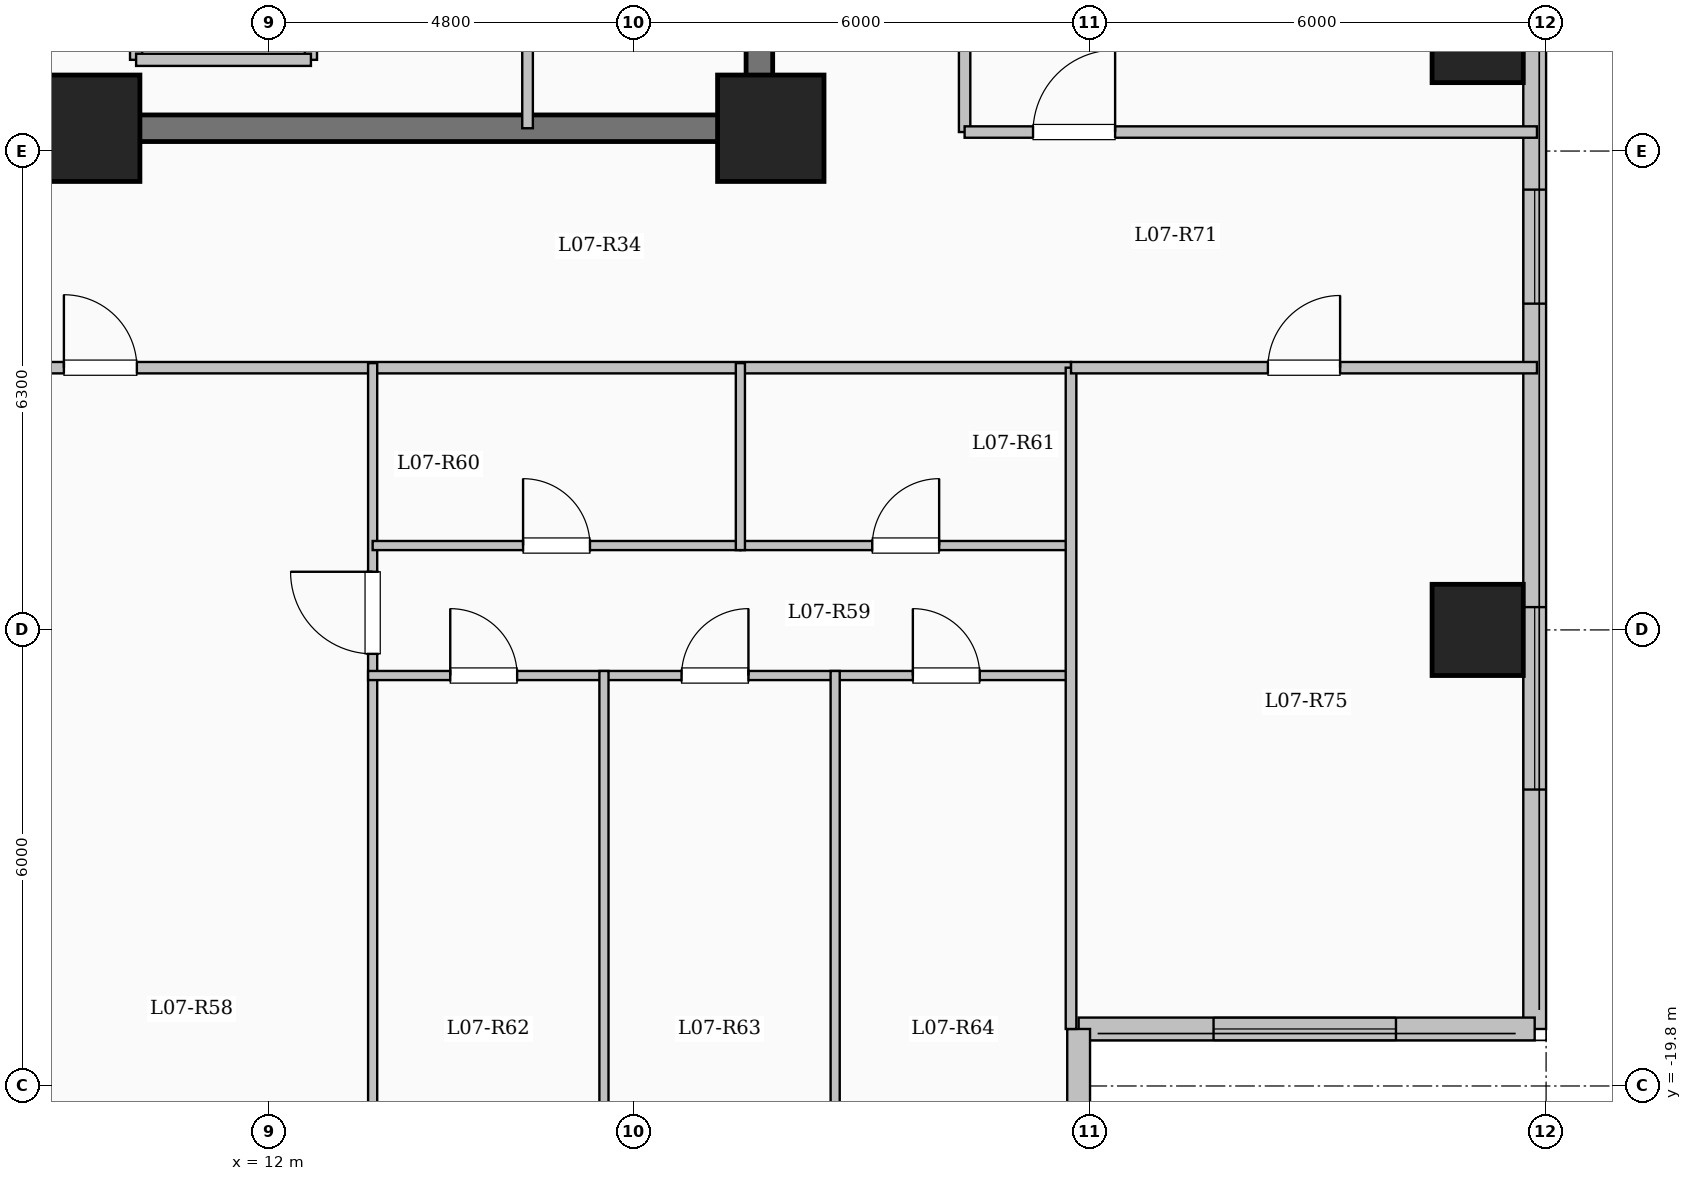
"""IFC4 building model, lengths in metres.
Left out: names, types, materials, properties, quantities, classifications, styles, units other than length and angle.
Written with IfcOpenShell. Run it as: python <this file> out.ifc"""

import sys

from ifc_helpers import new_model, si_unit, direction, frame, frame_2d, origin, origin_2d, place, context, subcontext, project, spatial, rectangle, extrude, element, fill, save


model = new_model("IFC4")
c1 = context("Model", 3, precision=1e-05, world=origin(), true_north=direction((0.0, 1.0)))
c2 = subcontext(c1, "Body", "Model", "MODEL_VIEW")
j1 = project(units=[si_unit("LENGTHUNIT", "METRE"), si_unit("PLANEANGLEUNIT", "RADIAN")], contexts=[c1])
p1 = place(None, origin())
s1 = spatial("IfcSite", under=j1, at=p1, CompositionType="ELEMENT")
p2 = place(p1, origin())
s2 = spatial("IfcBuilding", under=s1, at=p2, CompositionType="ELEMENT")
p3 = place(p2, frame((0.0, 0.0, 30.7)))
s3 = spatial("IfcBuildingStorey", under=s2, at=p3, CompositionType="ELEMENT", Elevation=30.7)
for number, where, z_axis, x_axis in (
    (1, (9.6, -7.2, 0.0), (0.0, 0.0, 1.0), (1.0, 0.0, 0.0)),
    (2, (18.6, -7.2, 0.0), (0.0, 0.0, 1.0), (1.0, 0.0, 0.0)),
):
    element("IfcColumn", number, at=place(p3, frame(where, z_axis=z_axis, x_axis=x_axis)), inside=s3, PredefinedType="COLUMN", context=c2, shape_type="SweptSolid", body=[
        extrude(rectangle(XDim=1.4, YDim=1.4, at=origin_2d()), origin(), (0.0, 0.0, 1.0), 3.35),
    ])
for number, where, z_axis, x_axis in (
    (3, (27.9, -13.8, 0.0), (0.0, 0.0, 1.0), (1.0, 0.0, 0.0)),
    (4, (27.9, -6.0, 0.0), (0.0, 0.0, 1.0), (1.0, 0.0, 0.0)),
):
    element("IfcColumn", number, at=place(p3, frame(where, z_axis=z_axis, x_axis=x_axis)), inside=s3, PredefinedType="COLUMN", context=c2, shape_type="SweptSolid", body=[
        extrude(rectangle(XDim=1.2, YDim=1.2, at=origin_2d()), origin(), (0.0, 0.0, 1.0), 3.35),
    ])
p4 = place(p3, frame((28.65, 19.05, 0.0), z_axis=(0.0, 0.0, 1.0), x_axis=(0.0, -1.0, 0.0)))
e5 = element("IfcWall", 5, at=p4, inside=s3, PredefinedType="SOLIDWALL", context=c2, shape_type="SweptSolid", body=[
    extrude(rectangle(XDim=38.1, YDim=0.3, at=frame_2d((19.05, 0.0))), origin(), (0.0, 0.0, 1.0), 3.1),
])
p5 = place(p4, frame((2.275, 0.0, 0.9)))
e6 = element("IfcOpeningElement", 6, at=p5, cuts=e5, PredefinedType="OPENING", context=c2, shape_type="SweptSolid", body=[
    extrude(rectangle(XDim=2.0, YDim=1.7, at=frame_2d((1.0, 0.85))), frame((0.0, 0.16, 0.0), z_axis=(0.0, -1.0, 0.0), x_axis=(1.0, 0.0, 0.0)), (0.0, 0.0, 1.0), 0.32),
])
p6 = place(p4, frame((6.925, 0.0, 0.95)))
e7 = element("IfcOpeningElement", 7, at=p6, cuts=e5, PredefinedType="OPENING", context=c2, shape_type="SweptSolid", body=[
    extrude(rectangle(XDim=1.0, YDim=1.5, at=frame_2d((0.5, 0.75))), frame((0.0, 0.16, 0.0), z_axis=(0.0, -1.0, 0.0), x_axis=(1.0, 0.0, 0.0)), (0.0, 0.0, 1.0), 0.32),
])
p7 = place(p4, frame((16.3, 0.0, 0.9)))
e8 = element("IfcOpeningElement", 8, at=p7, cuts=e5, PredefinedType="OPENING", context=c2, shape_type="SweptSolid", body=[
    extrude(rectangle(XDim=2.0, YDim=1.7, at=frame_2d((1.0, 0.85))), frame((0.0, 0.16, 0.0), z_axis=(0.0, -1.0, 0.0), x_axis=(1.0, 0.0, 0.0)), (0.0, 0.0, 1.0), 0.32),
])
p8 = place(p4, frame((27.058, 0.0, 0.9)))
e9 = element("IfcOpeningElement", 9, at=p8, cuts=e5, PredefinedType="OPENING", context=c2, shape_type="SweptSolid", body=[
    extrude(rectangle(XDim=1.5, YDim=1.65, at=frame_2d((0.75, 0.825))), frame((0.0, 0.16, 0.0), z_axis=(0.0, -1.0, 0.0), x_axis=(1.0, 0.0, 0.0)), (0.0, 0.0, 1.0), 0.32),
])
p9 = place(p4, frame((32.55, 0.0, 0.9)))
e10 = element("IfcOpeningElement", 10, at=p9, cuts=e5, PredefinedType="OPENING", context=c2, shape_type="SweptSolid", body=[
    extrude(rectangle(XDim=2.4, YDim=1.8, at=frame_2d((1.2, 0.9))), frame((0.0, 0.16, 0.0), z_axis=(0.0, -1.0, 0.0), x_axis=(1.0, 0.0, 0.0)), (0.0, 0.0, 1.0), 0.32),
])
p10 = place(p3, frame((28.65, -19.05, 0.0), z_axis=(0.0, 0.0, 1.0), x_axis=(-1.0, 0.0, 0.0)))
e11 = element("IfcWall", 11, at=p10, inside=s3, PredefinedType="SOLIDWALL", context=c2, shape_type="SweptSolid", body=[
    extrude(rectangle(XDim=6.0, YDim=0.3, at=frame_2d((3.0, 0.0))), origin(), (0.0, 0.0, 1.0), 3.1),
])
p11 = place(p10, frame((1.825, 0.0, 0.9)))
e12 = element("IfcOpeningElement", 12, at=p11, cuts=e11, PredefinedType="OPENING", context=c2, shape_type="SweptSolid", body=[
    extrude(rectangle(XDim=2.4, YDim=1.8, at=frame_2d((1.2, 0.9))), frame((0.0, 0.16, 0.0), z_axis=(0.0, -1.0, 0.0), x_axis=(1.0, 0.0, 0.0)), (0.0, 0.0, 1.0), 0.32),
])
p12 = place(p3, frame((22.65, -19.05, 0.0), z_axis=(0.0, 0.0, 1.0), x_axis=(0.0, -1.0, 0.0)))
e13 = element("IfcWall", 13, at=p12, inside=s3, PredefinedType="SOLIDWALL", context=c2, shape_type="SweptSolid", body=[
    extrude(rectangle(XDim=4.5, YDim=0.3, at=frame_2d((2.25, 0.0))), origin(), (0.0, 0.0, 1.0), 3.1),
])
p13 = place(p12, frame((1.333, 0.0, 0.9)))
e14 = element("IfcOpeningElement", 14, at=p13, cuts=e13, PredefinedType="OPENING", context=c2, shape_type="SweptSolid", body=[
    extrude(rectangle(XDim=1.8, YDim=1.65, at=frame_2d((0.9, 0.825))), frame((0.0, 0.16, 0.0), z_axis=(0.0, -1.0, 0.0), x_axis=(1.0, 0.0, 0.0)), (0.0, 0.0, 1.0), 0.32),
])
for number, where, z_axis, x_axis in (
    (15, (10.25, -6.3, 0.0), (0.0, 0.0, 1.0), (0.0, 1.0, 0.0)),
    (16, (12.55, -6.3, 0.0), (0.0, 0.0, 1.0), (0.0, 1.0, 0.0)),
):
    element("IfcWall", number, at=place(p3, frame(where, z_axis=z_axis, x_axis=x_axis)), inside=s3, PredefinedType="SOLIDWALL", context=c2, shape_type="SweptSolid", body=[
        extrude(rectangle(XDim=2.6, YDim=0.16, at=frame_2d((1.3, 0.0))), origin(), (0.0, 0.0, 1.0), 3.1),
    ])
p14 = place(p3, frame((10.25, -6.3, 0.0), z_axis=(0.0, 0.0, 1.0), x_axis=(1.0, 0.0, 0.0)))
e17 = element("IfcWall", 17, at=p14, inside=s3, PredefinedType="SOLIDWALL", context=c2, shape_type="SweptSolid", body=[
    extrude(rectangle(XDim=2.3, YDim=0.16, at=frame_2d((1.15, 0.0))), origin(), (0.0, 0.0, 1.0), 3.1),
])
p15 = place(p3, frame((18.45, -7.375, 0.0), z_axis=(0.0, 0.0, 1.0), x_axis=(0.0, 1.0, 0.0)))
e18 = element("IfcWall", 18, at=p15, inside=s3, PredefinedType="SHEAR", context=c2, shape_type="SweptSolid", body=[
    extrude(rectangle(XDim=14.05, YDim=0.35, at=frame_2d((7.025, 0.0))), origin(), (0.0, 0.0, 1.0), 3.35),
])
p16 = place(p3, frame((10.075, -7.2, 0.0), z_axis=(0.0, 0.0, 1.0), x_axis=(1.0, 0.0, 0.0)))
e19 = element("IfcWall", 19, at=p16, inside=s3, PredefinedType="SHEAR", context=c2, shape_type="SweptSolid", body=[
    extrude(rectangle(XDim=8.55, YDim=0.35, at=frame_2d((4.275, 0.0))), origin(), (0.0, 0.0, 1.0), 3.35),
])
p17 = place(p3, frame((15.4, -7.2, 0.0), z_axis=(0.0, 0.0, 1.0), x_axis=(0.0, 1.0, 0.0)))
e20 = element("IfcWall", 20, at=p17, inside=s3, PredefinedType="PARTITIONING", context=c2, shape_type="SweptSolid", body=[
    extrude(rectangle(XDim=10.45, YDim=0.14, at=frame_2d((5.225, 0.0))), origin(), (0.0, 0.0, 1.0), 3.1),
])
p18 = place(p17, frame((9.25, 0.0, 0.0)))
e21 = element("IfcOpeningElement", 21, at=p18, cuts=e20, PredefinedType="OPENING", context=c2, shape_type="SweptSolid", body=[
    extrude(rectangle(XDim=0.9, YDim=2.08, at=frame_2d((0.45, 1.04))), frame((0.0, 0.08, 0.0), z_axis=(0.0, -1.0, 0.0), x_axis=(1.0, 0.0, 0.0)), (0.0, 0.0, 1.0), 0.16),
])
p19 = place(p3, frame((21.15, -7.25, 0.0), z_axis=(0.0, 0.0, 1.0), x_axis=(0.0, 1.0, 0.0)))
e22 = element("IfcWall", 22, at=p19, inside=s3, PredefinedType="PARTITIONING", context=c2, shape_type="SweptSolid", body=[
    extrude(rectangle(XDim=18.0, YDim=0.15, at=frame_2d((9.0, 0.0))), origin(), (0.0, 0.0, 1.0), 2.585),
])
p20 = place(p3, frame((8.55, -10.35, 0.0), z_axis=(0.0, 0.0, 1.0), x_axis=(1.0, 0.0, 0.0)))
e23 = element("IfcWall", 23, at=p20, inside=s3, PredefinedType="PARTITIONING", context=c2, shape_type="SweptSolid", body=[
    extrude(rectangle(XDim=14.0, YDim=0.15, at=frame_2d((7.0, 0.0))), origin(), (0.0, 0.0, 1.0), 3.1),
])
p21 = place(p20, frame((0.75, 0.0, 0.0)))
e24 = element("IfcOpeningElement", 24, at=p21, cuts=e23, PredefinedType="OPENING", context=c2, shape_type="SweptSolid", body=[
    extrude(rectangle(XDim=0.96, YDim=2.15, at=frame_2d((0.48, 1.075))), frame((0.0, 0.085, 0.0), z_axis=(0.0, -1.0, 0.0), x_axis=(1.0, 0.0, 0.0)), (0.0, 0.0, 1.0), 0.17),
])
p22 = place(p3, frame((13.362, -23.6, 0.0), z_axis=(0.0, 0.0, 1.0), x_axis=(0.0, 1.0, 0.0)))
e25 = element("IfcWall", 25, at=p22, inside=s3, PredefinedType="PARTITIONING", context=c2, shape_type="SweptSolid", body=[
    extrude(rectangle(XDim=13.31, YDim=0.12, at=frame_2d((6.655, 0.0))), origin(), (0.0, 0.0, 1.0), 3.1),
])
p23 = place(p22, frame((9.485, 0.0, 0.0)))
e26 = element("IfcOpeningElement", 26, at=p23, cuts=e25, PredefinedType="OPENING", context=c2, shape_type="SweptSolid", body=[
    extrude(rectangle(XDim=1.08, YDim=2.15, at=frame_2d((0.54, 1.075))), frame((0.0, 0.07, 0.0), z_axis=(0.0, -1.0, 0.0), x_axis=(1.0, 0.0, 0.0)), (0.0, 0.0, 1.0), 0.14),
])
p24 = place(p3, frame((13.362, -12.69, 0.0), z_axis=(0.0, 0.0, 1.0), x_axis=(1.0, 0.0, 0.0)))
e27 = element("IfcWall", 27, at=p24, inside=s3, PredefinedType="PARTITIONING", context=c2, shape_type="SweptSolid", body=[
    extrude(rectangle(XDim=4.838, YDim=0.12, at=frame_2d((2.419, 0.0))), origin(), (0.0, 0.0, 1.0), 2.585),
])
p25 = place(p24, frame((1.979, 0.0, 0.0)))
e28 = element("IfcOpeningElement", 28, at=p25, cuts=e27, PredefinedType="OPENING", context=c2, shape_type="SweptSolid", body=[
    extrude(rectangle(XDim=0.88, YDim=2.1, at=frame_2d((0.44, 1.05))), frame((0.0, 0.07, 0.0), z_axis=(0.0, -1.0, 0.0), x_axis=(1.0, 0.0, 0.0)), (0.0, 0.0, 1.0), 0.14),
])
p26 = place(p3, frame((18.2, -12.69, 0.0), z_axis=(0.0, 0.0, 1.0), x_axis=(1.0, 0.0, 0.0)))
e29 = element("IfcWall", 29, at=p26, inside=s3, PredefinedType="PARTITIONING", context=c2, shape_type="SweptSolid", body=[
    extrude(rectangle(XDim=4.35, YDim=0.12, at=frame_2d((2.175, 0.0))), origin(), (0.0, 0.0, 1.0), 3.1),
])
p27 = place(p26, frame((1.735, 0.0, 0.0)))
e30 = element("IfcOpeningElement", 30, at=p27, cuts=e29, PredefinedType="OPENING", context=c2, shape_type="SweptSolid", body=[
    extrude(rectangle(XDim=0.88, YDim=2.1, at=frame_2d((0.44, 1.05))), frame((0.0, 0.07, 0.0), z_axis=(0.0, -1.0, 0.0), x_axis=(1.0, 0.0, 0.0)), (0.0, 0.0, 1.0), 0.14),
])
p28 = place(p3, frame((13.302, -14.4, 0.0), z_axis=(0.0, 0.0, 1.0), x_axis=(1.0, 0.0, 0.0)))
e31 = element("IfcWall", 31, at=p28, inside=s3, PredefinedType="PARTITIONING", context=c2, shape_type="SweptSolid", body=[
    extrude(rectangle(XDim=9.308, YDim=0.12, at=frame_2d((4.654, 0.0))), origin(), (0.0, 0.0, 1.0), 3.1),
])
p29 = place(p28, frame((1.081, 0.0, 0.0)))
e32 = element("IfcOpeningElement", 32, at=p29, cuts=e31, PredefinedType="OPENING", context=c2, shape_type="SweptSolid", body=[
    extrude(rectangle(XDim=0.88, YDim=2.1, at=frame_2d((0.44, 1.05))), frame((0.0, 0.07, 0.0), z_axis=(0.0, -1.0, 0.0), x_axis=(1.0, 0.0, 0.0)), (0.0, 0.0, 1.0), 0.14),
])
p30 = place(p28, frame((4.124, 0.0, 0.0)))
e33 = element("IfcOpeningElement", 33, at=p30, cuts=e31, PredefinedType="OPENING", context=c2, shape_type="SweptSolid", body=[
    extrude(rectangle(XDim=0.88, YDim=2.1, at=frame_2d((0.44, 1.05))), frame((0.0, 0.07, 0.0), z_axis=(0.0, -1.0, 0.0), x_axis=(1.0, 0.0, 0.0)), (0.0, 0.0, 1.0), 0.14),
])
p31 = place(p28, frame((7.167, 0.0, 0.0)))
e34 = element("IfcOpeningElement", 34, at=p31, cuts=e31, PredefinedType="OPENING", context=c2, shape_type="SweptSolid", body=[
    extrude(rectangle(XDim=0.88, YDim=2.1, at=frame_2d((0.44, 1.05))), frame((0.0, 0.07, 0.0), z_axis=(0.0, -1.0, 0.0), x_axis=(1.0, 0.0, 0.0)), (0.0, 0.0, 1.0), 0.14),
])
p32 = place(p3, frame((18.2, -12.75, 0.0), z_axis=(0.0, 0.0, 1.0), x_axis=(0.0, 1.0, 0.0)))
e35 = element("IfcWall", 35, at=p32, inside=s3, PredefinedType="PARTITIONING", context=c2, shape_type="SweptSolid", body=[
    extrude(rectangle(XDim=2.46, YDim=0.12, at=frame_2d((1.23, 0.0))), origin(), (0.0, 0.0, 1.0), 3.1),
])
for number, where, z_axis, x_axis in (
    (36, (16.405, -23.6, 0.0), (0.0, 0.0, 1.0), (0.0, 1.0, 0.0)),
    (37, (19.447, -23.6, 0.0), (0.0, 0.0, 1.0), (0.0, 1.0, 0.0)),
):
    element("IfcWall", number, at=place(p3, frame(where, z_axis=z_axis, x_axis=x_axis)), inside=s3, PredefinedType="PARTITIONING", context=c2, shape_type="SweptSolid", body=[
        extrude(rectangle(XDim=9.26, YDim=0.12, at=frame_2d((4.63, 0.0))), origin(), (0.0, 0.0, 1.0), 3.1),
    ])
p33 = place(p3, frame((21.15, -7.25, 0.0), z_axis=(0.0, 0.0, 1.0), x_axis=(1.0, 0.0, 0.0)))
e38 = element("IfcWall", 38, at=p33, inside=s3, PredefinedType="PARTITIONING", context=c2, shape_type="SweptSolid", body=[
    extrude(rectangle(XDim=7.53, YDim=0.15, at=frame_2d((3.765, 0.0))), origin(), (0.0, 0.0, 1.0), 3.1),
])
p34 = place(p33, frame((0.9, 0.0, 0.0)))
e39 = element("IfcOpeningElement", 39, at=p34, cuts=e38, PredefinedType="OPENING", context=c2, shape_type="SweptSolid", body=[
    extrude(rectangle(XDim=1.08, YDim=2.15, at=frame_2d((0.54, 1.075))), frame((0.0, 0.085, 0.0), z_axis=(0.0, -1.0, 0.0), x_axis=(1.0, 0.0, 0.0)), (0.0, 0.0, 1.0), 0.17),
])
p35 = place(p3, frame((22.55, -19.05, 0.0), z_axis=(0.0, 0.0, 1.0), x_axis=(0.0, 1.0, 0.0)))
e40 = element("IfcWall", 40, at=p35, inside=s3, PredefinedType="PARTITIONING", context=c2, shape_type="SweptSolid", body=[
    extrude(rectangle(XDim=8.7, YDim=0.14, at=frame_2d((4.35, 0.0))), origin(), (0.0, 0.0, 1.0), 3.1),
])
p36 = place(p3, frame((22.55, -10.35, 0.0), z_axis=(0.0, 0.0, 1.0), x_axis=(1.0, 0.0, 0.0)))
e41 = element("IfcWall", 41, at=p36, inside=s3, PredefinedType="PARTITIONING", context=c2, shape_type="SweptSolid", body=[
    extrude(rectangle(XDim=6.13, YDim=0.15, at=frame_2d((3.065, 0.0))), origin(), (0.0, 0.0, 1.0), 3.1),
])
p37 = place(p36, frame((2.59, 0.0, 0.0)))
e42 = element("IfcOpeningElement", 42, at=p37, cuts=e41, PredefinedType="OPENING", context=c2, shape_type="SweptSolid", body=[
    extrude(rectangle(XDim=0.95, YDim=2.15, at=frame_2d((0.475, 1.075))), frame((0.0, 0.085, 0.0), z_axis=(0.0, -1.0, 0.0), x_axis=(1.0, 0.0, 0.0)), (0.0, 0.0, 1.0), 0.17),
])
p38 = place(p8, origin())
e43 = element("IfcWindow", 43, at=p38, inside=s3, PartitioningType="SINGLE_PANEL", PredefinedType="WINDOW", context=c2, shape_type="SweptSolid", body=[
    extrude(rectangle(XDim=1.5, YDim=1.65, at=frame_2d((0.75, 0.825))), frame((0.0, 0.03, 0.0), z_axis=(0.0, -1.0, 0.0), x_axis=(1.0, 0.0, 0.0)), (0.0, 0.0, 1.0), 0.06),
])
fill(e9, e43)
p39 = place(p9, origin())
e44 = element("IfcWindow", 44, at=p39, inside=s3, PartitioningType="SINGLE_PANEL", PredefinedType="WINDOW", context=c2, shape_type="SweptSolid", body=[
    extrude(rectangle(XDim=2.4, YDim=1.8, at=frame_2d((1.2, 0.9))), frame((0.0, 0.03, 0.0), z_axis=(0.0, -1.0, 0.0), x_axis=(1.0, 0.0, 0.0)), (0.0, 0.0, 1.0), 0.06),
])
fill(e10, e44)
p40 = place(p11, origin())
e45 = element("IfcWindow", 45, at=p40, inside=s3, PartitioningType="SINGLE_PANEL", PredefinedType="WINDOW", context=c2, shape_type="SweptSolid", body=[
    extrude(rectangle(XDim=2.4, YDim=1.8, at=frame_2d((1.2, 0.9))), frame((0.0, 0.03, 0.0), z_axis=(0.0, -1.0, 0.0), x_axis=(1.0, 0.0, 0.0)), (0.0, 0.0, 1.0), 0.06),
])
fill(e12, e45)
p41 = place(p21, origin())
e46 = element("IfcDoor", 46, at=p41, inside=s3, OperationType="SINGLE_SWING_LEFT", PredefinedType="DOOR", context=c2, shape_type="SweptSolid", body=[
    extrude(rectangle(XDim=0.96, YDim=2.15, at=frame_2d((0.48, 1.075))), frame((0.0, 0.025, 0.0), z_axis=(0.0, -1.0, 0.0), x_axis=(1.0, 0.0, 0.0)), (0.0, 0.0, 1.0), 0.05),
])
fill(e24, e46)
p42 = place(p23, origin())
e47 = element("IfcDoor", 47, at=p42, inside=s3, OperationType="SINGLE_SWING_RIGHT", PredefinedType="DOOR", context=c2, shape_type="SweptSolid", body=[
    extrude(rectangle(XDim=1.08, YDim=2.15, at=frame_2d((0.54, 1.075))), frame((0.0, 0.025, 0.0), z_axis=(0.0, -1.0, 0.0), x_axis=(1.0, 0.0, 0.0)), (0.0, 0.0, 1.0), 0.05),
])
fill(e26, e47)
p43 = place(p25, origin())
e48 = element("IfcDoor", 48, at=p43, inside=s3, OperationType="SINGLE_SWING_LEFT", PredefinedType="DOOR", context=c2, shape_type="SweptSolid", body=[
    extrude(rectangle(XDim=0.88, YDim=2.1, at=frame_2d((0.44, 1.05))), frame((0.0, 0.025, 0.0), z_axis=(0.0, -1.0, 0.0), x_axis=(1.0, 0.0, 0.0)), (0.0, 0.0, 1.0), 0.05),
])
fill(e28, e48)
p44 = place(p27, origin())
e49 = element("IfcDoor", 49, at=p44, inside=s3, OperationType="SINGLE_SWING_RIGHT", PredefinedType="DOOR", context=c2, shape_type="SweptSolid", body=[
    extrude(rectangle(XDim=0.88, YDim=2.1, at=frame_2d((0.44, 1.05))), frame((0.0, 0.025, 0.0), z_axis=(0.0, -1.0, 0.0), x_axis=(1.0, 0.0, 0.0)), (0.0, 0.0, 1.0), 0.05),
])
fill(e30, e49)
p45 = place(p29, origin())
e50 = element("IfcDoor", 50, at=p45, inside=s3, OperationType="SINGLE_SWING_LEFT", PredefinedType="DOOR", context=c2, shape_type="SweptSolid", body=[
    extrude(rectangle(XDim=0.88, YDim=2.1, at=frame_2d((0.44, 1.05))), frame((0.0, 0.025, 0.0), z_axis=(0.0, -1.0, 0.0), x_axis=(1.0, 0.0, 0.0)), (0.0, 0.0, 1.0), 0.05),
])
fill(e32, e50)
p46 = place(p30, origin())
e51 = element("IfcDoor", 51, at=p46, inside=s3, OperationType="SINGLE_SWING_RIGHT", PredefinedType="DOOR", context=c2, shape_type="SweptSolid", body=[
    extrude(rectangle(XDim=0.88, YDim=2.1, at=frame_2d((0.44, 1.05))), frame((0.0, 0.025, 0.0), z_axis=(0.0, -1.0, 0.0), x_axis=(1.0, 0.0, 0.0)), (0.0, 0.0, 1.0), 0.05),
])
fill(e33, e51)
p47 = place(p31, origin())
e52 = element("IfcDoor", 52, at=p47, inside=s3, OperationType="SINGLE_SWING_LEFT", PredefinedType="DOOR", context=c2, shape_type="SweptSolid", body=[
    extrude(rectangle(XDim=0.88, YDim=2.1, at=frame_2d((0.44, 1.05))), frame((0.0, 0.025, 0.0), z_axis=(0.0, -1.0, 0.0), x_axis=(1.0, 0.0, 0.0)), (0.0, 0.0, 1.0), 0.05),
])
fill(e34, e52)
p48 = place(p37, origin())
e53 = element("IfcDoor", 53, at=p48, inside=s3, OperationType="SINGLE_SWING_RIGHT", PredefinedType="DOOR", context=c2, shape_type="SweptSolid", body=[
    extrude(rectangle(XDim=0.95, YDim=2.15, at=frame_2d((0.475, 1.075))), frame((0.0, 0.025, 0.0), z_axis=(0.0, -1.0, 0.0), x_axis=(1.0, 0.0, 0.0)), (0.0, 0.0, 1.0), 0.05),
])
fill(e42, e53)
p49 = place(p34, origin())
e54 = element("IfcDoor", 54, at=p49, inside=s3, OperationType="SINGLE_SWING_RIGHT", PredefinedType="DOOR", context=c2, shape_type="SweptSolid", body=[
    extrude(rectangle(XDim=1.08, YDim=2.15, at=frame_2d((0.54, 1.075))), frame((0.0, 0.025, 0.0), z_axis=(0.0, -1.0, 0.0), x_axis=(1.0, 0.0, 0.0)), (0.0, 0.0, 1.0), 0.05),
])
fill(e39, e54)
save(model, sys.argv[1])
